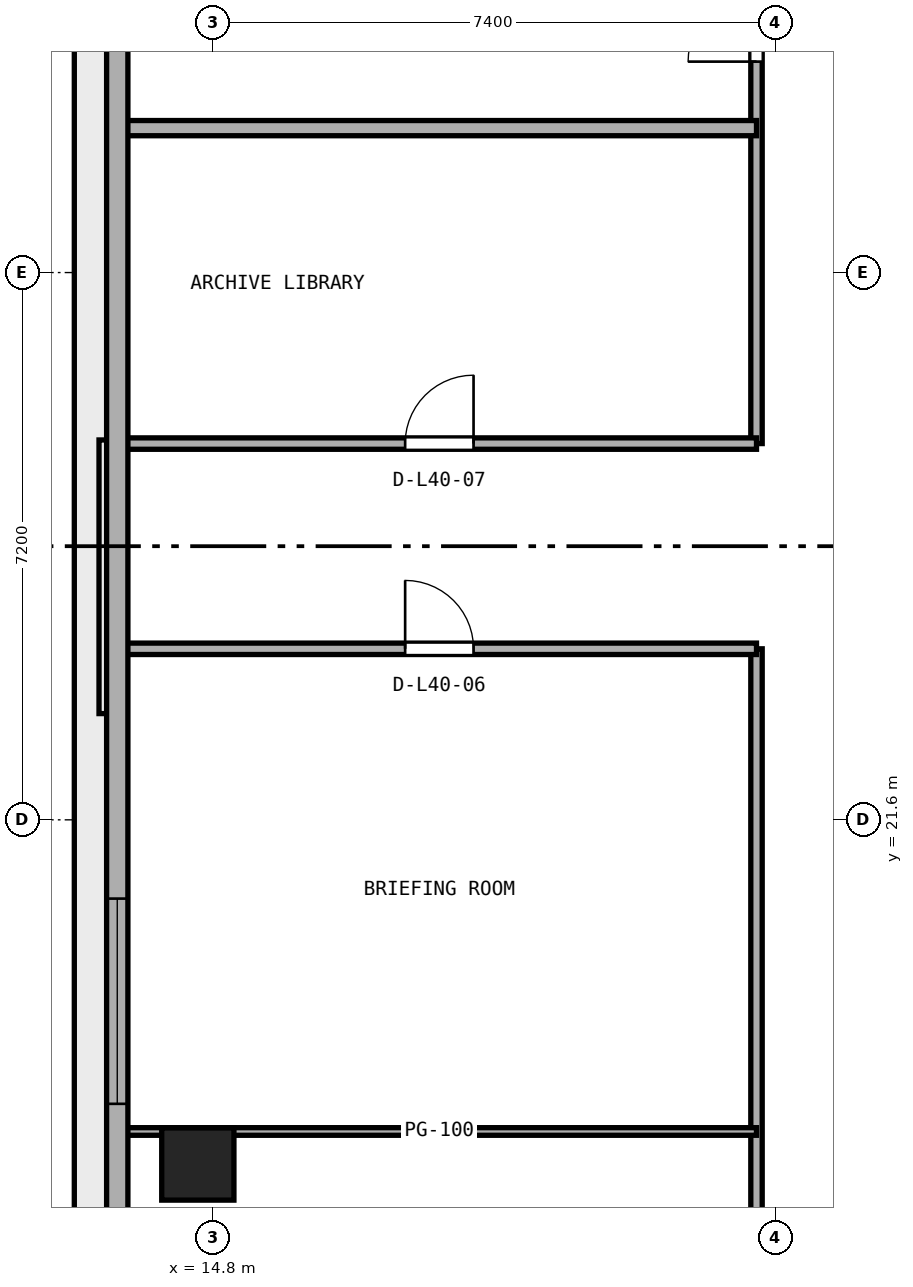
"""IFC4 building model, lengths in metres.
Left out: names, types, materials, properties, quantities, classifications, styles, units other than length and angle.
Written with IfcOpenShell. Run it as: python <this file> out.ifc"""

import sys

from ifc_helpers import new_model, si_unit, direction, frame, frame_2d, origin, origin_2d, place, context, subcontext, project, spatial, rectangle, extrude, element, fill, save


model = new_model("IFC4")
c1 = context("Model", 3, precision=1e-05, world=origin(), true_north=direction((0.0, 1.0)))
c2 = subcontext(c1, "Body", "Model", "MODEL_VIEW")
j1 = project(units=[si_unit("LENGTHUNIT", "METRE"), si_unit("PLANEANGLEUNIT", "RADIAN")], contexts=[c1])
p1 = place(None, origin())
s1 = spatial("IfcSite", under=j1, at=p1, CompositionType="ELEMENT")
p2 = place(p1, origin())
s2 = spatial("IfcBuilding", under=s1, at=p2, CompositionType="ELEMENT")
p3 = place(p2, frame((0.0, 0.0, 159.2)))
s3 = spatial("IfcBuildingStorey", under=s2, at=p3, CompositionType="ELEMENT", Elevation=159.2)
p4 = place(p3, frame((14.6, 17.072, 0.0), z_axis=(0.0, 0.0, 1.0), x_axis=(1.0, 0.0, 0.0)))
e1 = element("IfcColumn", 1, at=p4, inside=s3, PredefinedType="COLUMN", context=c2, shape_type="SweptSolid", body=[
    extrude(rectangle(XDim=0.95, YDim=0.95, at=origin_2d()), origin(), (0.0, 0.0, 1.0), 3.8),
])
p5 = place(p3, frame((21.95, 7.957, 0.0), z_axis=(0.0, 0.0, 1.0), x_axis=(0.0, 1.0, 0.0)))
e2 = element("IfcWall", 2, at=p5, inside=s3, PredefinedType="PARTITIONING", context=c2, shape_type="SweptSolid", body=[
    extrude(rectangle(XDim=15.894, YDim=0.15, at=frame_2d((7.947, 0.0))), origin(), (0.0, 0.0, 1.0), 3.54),
])
p6 = place(p5, frame((7.118, 0.0, 0.0)))
e3 = element("IfcOpeningElement", 3, at=p6, cuts=e2, PredefinedType="OPENING", context=c2, shape_type="SweptSolid", body=[
    extrude(rectangle(XDim=0.9, YDim=2.1, at=frame_2d((0.45, 1.05))), frame((0.0, 0.085, 0.0), z_axis=(0.0, -1.0, 0.0), x_axis=(1.0, 0.0, 0.0)), (0.0, 0.0, 1.0), 0.17),
])
p7 = place(p3, frame((21.95, 26.55, 0.0), z_axis=(0.0, 0.0, 1.0), x_axis=(0.0, 1.0, 0.0)))
e4 = element("IfcWall", 4, at=p7, inside=s3, PredefinedType="PARTITIONING", context=c2, shape_type="SweptSolid", body=[
    extrude(rectangle(XDim=10.3, YDim=0.15, at=frame_2d((5.15, 0.0))), origin(), (0.0, 0.0, 1.0), 3.54),
])
p8 = place(p7, frame((5.025, 0.0, 0.0)))
e5 = element("IfcOpeningElement", 5, at=p8, cuts=e4, PredefinedType="OPENING", context=c2, shape_type="SweptSolid", body=[
    extrude(rectangle(XDim=0.9, YDim=2.1, at=frame_2d((0.45, 1.05))), frame((0.0, 0.085, 0.0), z_axis=(0.0, -1.0, 0.0), x_axis=(1.0, 0.0, 0.0)), (0.0, 0.0, 1.0), 0.17),
])
p9 = place(p3, frame((13.605, 17.5, 0.0), z_axis=(0.0, 0.0, 1.0), x_axis=(1.0, 0.0, 0.0)))
e6 = element("IfcWall", 6, at=p9, inside=s3, PredefinedType="PARTITIONING", context=c2, shape_type="SweptSolid", body=[
    extrude(rectangle(XDim=8.345, YDim=0.1, at=frame_2d((4.172, 0.0))), origin(), (0.0, 0.0, 1.0), 2.923),
])
p10 = place(p3, frame((13.605, 23.85, 0.0), z_axis=(0.0, 0.0, 1.0), x_axis=(1.0, 0.0, 0.0)))
e7 = element("IfcWall", 7, at=p10, inside=s3, PredefinedType="PARTITIONING", context=c2, shape_type="SweptSolid", body=[
    extrude(rectangle(XDim=8.345, YDim=0.15, at=frame_2d((4.172, 0.0))), origin(), (0.0, 0.0, 1.0), 3.54),
])
p11 = place(p10, frame((3.722, 0.0, 0.0)))
e8 = element("IfcOpeningElement", 8, at=p11, cuts=e7, PredefinedType="OPENING", context=c2, shape_type="SweptSolid", body=[
    extrude(rectangle(XDim=0.9, YDim=2.1, at=frame_2d((0.45, 1.05))), frame((0.0, 0.085, 0.0), z_axis=(0.0, -1.0, 0.0), x_axis=(1.0, 0.0, 0.0)), (0.0, 0.0, 1.0), 0.17),
])
p12 = place(p3, frame((13.605, 26.55, 0.0), z_axis=(0.0, 0.0, 1.0), x_axis=(1.0, 0.0, 0.0)))
e9 = element("IfcWall", 9, at=p12, inside=s3, PredefinedType="PARTITIONING", context=c2, shape_type="SweptSolid", body=[
    extrude(rectangle(XDim=8.345, YDim=0.15, at=frame_2d((4.172, 0.0))), origin(), (0.0, 0.0, 1.0), 3.54),
])
p13 = place(p12, frame((3.722, 0.0, 0.0)))
e10 = element("IfcOpeningElement", 10, at=p13, cuts=e9, PredefinedType="OPENING", context=c2, shape_type="SweptSolid", body=[
    extrude(rectangle(XDim=0.9, YDim=2.1, at=frame_2d((0.45, 1.05))), frame((0.0, 0.085, 0.0), z_axis=(0.0, -1.0, 0.0), x_axis=(1.0, 0.0, 0.0)), (0.0, 0.0, 1.0), 0.17),
])
p14 = place(p3, frame((13.605, 30.7, 0.0), z_axis=(0.0, 0.0, 1.0), x_axis=(1.0, 0.0, 0.0)))
e11 = element("IfcWall", 11, at=p14, inside=s3, PredefinedType="PARTITIONING", context=c2, shape_type="SweptSolid", body=[
    extrude(rectangle(XDim=8.345, YDim=0.2, at=frame_2d((4.172, 0.0))), origin(), (0.0, 0.0, 1.0), 3.54),
])
p15 = place(p3, frame((13.54, 33.673, 0.0), z_axis=(0.0, 0.0, 1.0), x_axis=(0.0, -1.0, 0.0)))
e12 = element("IfcWall", 12, at=p15, inside=s3, PredefinedType="STANDARD", context=c2, shape_type="SweptSolid", body=[
    extrude(rectangle(XDim=17.751, YDim=0.28, at=frame_2d((8.875, 0.0))), origin(), (0.0, 0.0, 1.0), 3.54),
])
p16 = place(p15, frame((13.109, 0.0, 0.9)))
e13 = element("IfcOpeningElement", 13, at=p16, cuts=e12, PredefinedType="OPENING", context=c2, shape_type="SweptSolid", body=[
    extrude(rectangle(XDim=2.7, YDim=1.75, at=frame_2d((1.35, 0.875))), frame((0.0, 0.15, 0.0), z_axis=(0.0, -1.0, 0.0), x_axis=(1.0, 0.0, 0.0)), (0.0, 0.0, 1.0), 0.3),
])
p17 = place(p11, origin())
e14 = element("IfcDoor", 14, at=p17, inside=s3, OperationType="SINGLE_SWING_LEFT", PredefinedType="DOOR", context=c2, shape_type="SweptSolid", body=[
    extrude(rectangle(XDim=0.9, YDim=2.1, at=frame_2d((0.45, 1.05))), frame((0.0, 0.025, 0.0), z_axis=(0.0, -1.0, 0.0), x_axis=(1.0, 0.0, 0.0)), (0.0, 0.0, 1.0), 0.05),
])
fill(e8, e14)
p18 = place(p13, origin())
e15 = element("IfcDoor", 15, at=p18, inside=s3, OperationType="SINGLE_SWING_RIGHT", PredefinedType="DOOR", context=c2, shape_type="SweptSolid", body=[
    extrude(rectangle(XDim=0.9, YDim=2.1, at=frame_2d((0.45, 1.05))), frame((0.0, 0.025, 0.0), z_axis=(0.0, -1.0, 0.0), x_axis=(1.0, 0.0, 0.0)), (0.0, 0.0, 1.0), 0.05),
])
fill(e10, e15)
p19 = place(p8, origin())
e16 = element("IfcDoor", 16, at=p19, inside=s3, OperationType="SINGLE_SWING_LEFT", PredefinedType="DOOR", context=c2, shape_type="SweptSolid", body=[
    extrude(rectangle(XDim=0.9, YDim=2.1, at=frame_2d((0.45, 1.05))), frame((0.0, 0.025, 0.0), z_axis=(0.0, -1.0, 0.0), x_axis=(1.0, 0.0, 0.0)), (0.0, 0.0, 1.0), 0.05),
])
fill(e5, e16)
p20 = place(p16, origin())
e17 = element("IfcWindow", 17, at=p20, inside=s3, PartitioningType="SINGLE_PANEL", PredefinedType="WINDOW", context=c2, shape_type="SweptSolid", body=[
    extrude(rectangle(XDim=2.7, YDim=1.75, at=frame_2d((1.35, 0.875))), frame((0.0, 0.03, 0.0), z_axis=(0.0, -1.0, 0.0), x_axis=(1.0, 0.0, 0.0)), (0.0, 0.0, 1.0), 0.06),
])
fill(e13, e17)
save(model, sys.argv[1])
